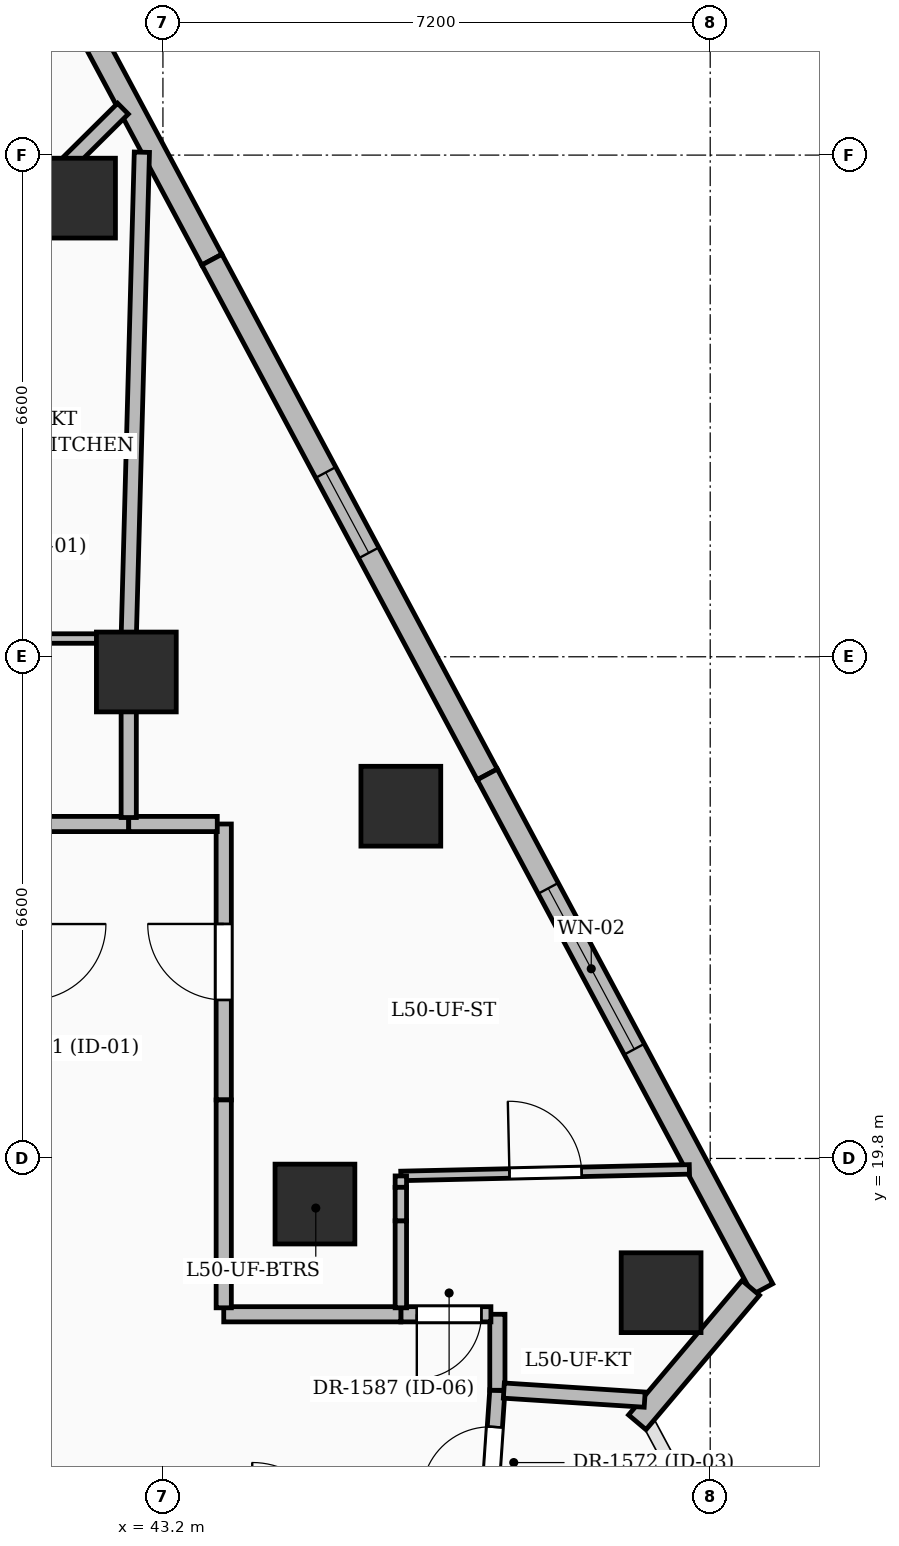
"""IFC4 building model, lengths in metres.
Left out: names, types, materials, properties, quantities, classifications, styles, units other than length and angle.
Written with IfcOpenShell. Run it as: python <this file> out.ifc"""

import sys

from ifc_helpers import new_model, si_unit, direction, frame, frame_2d, origin, origin_2d, place, context, subcontext, project, spatial, rectangle, extrude, element, fill, save


model = new_model("IFC4")
c1 = context("Model", 3, precision=1e-05, world=origin(), true_north=direction((0.0, 1.0)))
c2 = subcontext(c1, "Body", "Model", "MODEL_VIEW")
j1 = project(units=[si_unit("LENGTHUNIT", "METRE"), si_unit("PLANEANGLEUNIT", "RADIAN")], contexts=[c1])
p1 = place(None, origin())
s1 = spatial("IfcSite", under=j1, at=p1, CompositionType="ELEMENT")
p2 = place(p1, origin())
s2 = spatial("IfcBuilding", under=s1, at=p2, CompositionType="ELEMENT")
p3 = place(p2, frame((0.0, 0.0, 193.2)))
s3 = spatial("IfcBuildingStorey", under=s2, at=p3, CompositionType="ELEMENT", Elevation=193.2)
for number, where, z_axis, x_axis in (
    (1, (45.2, 19.2, 0.0), (0.0, 0.0, 1.0), (1.0, 0.0, 0.0)),
    (2, (42.85, 26.2, 0.0), (0.0, 0.0, 1.0), (1.0, 0.0, 0.0)),
    (3, (49.754, 18.034, 0.0), (0.0, 0.0, 1.0), (1.0, 0.0, 0.0)),
    (4, (46.33, 24.434, 0.0), (0.0, 0.0, 1.0), (1.0, 0.0, 0.0)),
    (5, (42.05, 32.434, 0.0), (0.0, 0.0, 1.0), (1.0, 0.0, 0.0)),
):
    element("IfcColumn", number, at=place(p3, frame(where, z_axis=z_axis, x_axis=x_axis)), inside=s3, PredefinedType="COLUMN", context=c2, shape_type="SweptSolid", body=[
        extrude(rectangle(XDim=1.05, YDim=1.05, at=origin_2d()), origin(), (0.0, 0.0, 1.0), 3.6),
    ])
p4 = place(p3, frame((40.495, 37.885, 0.0), z_axis=(0.0, 0.0, 1.0), x_axis=(0.471731834897, -0.88174206883, 0.0)))
e6 = element("IfcWall", 6, at=p4, inside=s3, PredefinedType="SOLIDWALL", context=c2, shape_type="SweptSolid", body=[
    extrude(rectangle(XDim=7.1, YDim=0.3, at=frame_2d((3.55, 0.0))), origin(), (0.0, 0.0, 1.0), 3.3),
])
p5 = place(p4, frame((2.07, 0.0, 0.6)))
e7 = element("IfcOpeningElement", 7, at=p5, cuts=e6, PredefinedType="OPENING", context=c2, shape_type="SweptSolid", body=[
    extrude(rectangle(XDim=1.5, YDim=2.1, at=frame_2d((0.75, 1.05))), frame((0.0, 0.16, 0.0), z_axis=(0.0, -1.0, 0.0), x_axis=(1.0, 0.0, 0.0)), (0.0, 0.0, 1.0), 0.32),
])
p6 = place(p3, frame((43.844, 31.625, 0.0), z_axis=(0.0, 0.0, 1.0), x_axis=(0.471736169991, -0.881739749542, 0.0)))
e8 = element("IfcWall", 8, at=p6, inside=s3, PredefinedType="SOLIDWALL", context=c2, shape_type="SweptSolid", body=[
    extrude(rectangle(XDim=7.68, YDim=0.3, at=frame_2d((3.84, 0.0))), origin(), (0.0, 0.0, 1.0), 3.3),
])
p7 = place(p6, frame((3.175, 0.0, 0.8)))
e9 = element("IfcOpeningElement", 9, at=p7, cuts=e8, PredefinedType="OPENING", context=c2, shape_type="SweptSolid", body=[
    extrude(rectangle(XDim=1.2, YDim=1.8, at=frame_2d((0.6, 0.9))), frame((0.0, 0.16, 0.0), z_axis=(0.0, -1.0, 0.0), x_axis=(1.0, 0.0, 0.0)), (0.0, 0.0, 1.0), 0.32),
])
p8 = place(p3, frame((47.467, 24.853, 0.0), z_axis=(0.0, 0.0, 1.0), x_axis=(0.471736169991, -0.881739749542, 0.0)))
e10 = element("IfcWall", 10, at=p8, inside=s3, PredefinedType="SOLIDWALL", context=c2, shape_type="SweptSolid", body=[
    extrude(rectangle(XDim=7.68, YDim=0.3, at=frame_2d((3.84, 0.0))), origin(), (0.0, 0.0, 1.0), 3.3),
])
p9 = place(p8, frame((1.7, 0.0, 0.6)))
e11 = element("IfcOpeningElement", 11, at=p9, cuts=e10, PredefinedType="OPENING", context=c2, shape_type="SweptSolid", body=[
    extrude(rectangle(XDim=2.4, YDim=2.1, at=frame_2d((1.2, 1.05))), frame((0.0, 0.16, 0.0), z_axis=(0.0, -1.0, 0.0), x_axis=(1.0, 0.0, 0.0)), (0.0, 0.0, 1.0), 0.32),
])
p10 = place(p3, frame((50.934, 18.097, 0.0), z_axis=(0.0, 0.0, 1.0), x_axis=(-0.645152076947, -0.764054184996, 0.0)))
e12 = element("IfcWall", 12, at=p10, inside=s3, PredefinedType="SOLIDWALL", context=c2, shape_type="SweptSolid", body=[
    extrude(rectangle(XDim=2.314, YDim=0.3, at=frame_2d((1.157, 0.0))), origin(), (0.0, 0.0, 1.0), 2.525),
])
p11 = place(p3, frame((47.425, 14.2, 0.0), z_axis=(0.0, 0.0, 1.0), x_axis=(0.068484119878, 0.997652206595, 0.0)))
e13 = element("IfcWall", 13, at=p11, inside=s3, PredefinedType="PARTITIONING", context=c2, shape_type="SweptSolid", body=[
    extrude(rectangle(XDim=2.556, YDim=0.2, at=frame_2d((1.278, 0.0))), origin(), (0.0, 0.0, 1.0), 2.414),
])
p12 = place(p11, frame((1.172, 0.0, 0.0)))
e14 = element("IfcOpeningElement", 14, at=p12, cuts=e13, PredefinedType="OPENING", context=c2, shape_type="SweptSolid", body=[
    extrude(rectangle(XDim=0.9, YDim=2.1, at=frame_2d((0.45, 1.05))), frame((0.0, 0.11, 0.0), z_axis=(0.0, -1.0, 0.0), x_axis=(1.0, 0.0, 0.0)), (0.0, 0.0, 1.0), 0.22),
])
p13 = place(p3, frame((42.75, 24.2, 0.0), z_axis=(0.0, 0.0, 1.0), x_axis=(-1.0, 0.0, 0.0)))
e15 = element("IfcWall", 15, at=p13, inside=s3, PredefinedType="PARTITIONING", context=c2, shape_type="SweptSolid", body=[
    extrude(rectangle(XDim=1.3, YDim=0.2, at=frame_2d((0.65, 0.0))), origin(), (0.0, 0.0, 1.0), 3.3),
])
p14 = place(p3, frame((44.0, 20.57, 0.0), z_axis=(0.0, 0.0, 1.0), x_axis=(0.0, 1.0, 0.0)))
e16 = element("IfcWall", 16, at=p14, inside=s3, PredefinedType="PARTITIONING", context=c2, shape_type="SweptSolid", body=[
    extrude(rectangle(XDim=3.63, YDim=0.2, at=frame_2d((1.815, 0.0))), origin(), (0.0, 0.0, 1.0), 2.386),
])
p15 = place(p14, frame((1.315, 0.0, 0.0)))
e17 = element("IfcOpeningElement", 17, at=p15, cuts=e16, PredefinedType="OPENING", context=c2, shape_type="SweptSolid", body=[
    extrude(rectangle(XDim=1.0, YDim=2.2, at=frame_2d((0.5, 1.1))), frame((0.0, 0.11, 0.0), z_axis=(0.0, -1.0, 0.0), x_axis=(1.0, 0.0, 0.0)), (0.0, 0.0, 1.0), 0.22),
])
p16 = place(p3, frame((43.915, 24.2, 0.0), z_axis=(0.0, 0.0, 1.0), x_axis=(-1.0, 0.0, 0.0)))
e18 = element("IfcWall", 18, at=p16, inside=s3, PredefinedType="PARTITIONING", context=c2, shape_type="SweptSolid", body=[
    extrude(rectangle(XDim=1.165, YDim=0.2, at=frame_2d((0.583, 0.0))), origin(), (0.0, 0.0, 1.0), 2.386),
])
p17 = place(p3, frame((47.6, 16.75, 0.0), z_axis=(0.0, 0.0, 1.0), x_axis=(0.0, 1.0, 0.0)))
e19 = element("IfcWall", 19, at=p17, inside=s3, PredefinedType="PARTITIONING", context=c2, shape_type="SweptSolid", body=[
    extrude(rectangle(XDim=1.0, YDim=0.2, at=frame_2d((0.5, 0.0))), origin(), (0.0, 0.0, 1.0), 2.721),
])
p18 = place(p3, frame((47.515, 17.75, 0.0), z_axis=(0.0, 0.0, 1.0), x_axis=(-1.0, 0.0, 0.0)))
e20 = element("IfcWall", 20, at=p18, inside=s3, PredefinedType="PARTITIONING", context=c2, shape_type="SweptSolid", body=[
    extrude(rectangle(XDim=1.185, YDim=0.2, at=frame_2d((0.592, 0.0))), origin(), (0.0, 0.0, 1.0), 2.721),
])
p19 = place(p18, frame((0.125, 0.0, 0.0)))
e21 = element("IfcOpeningElement", 21, at=p19, cuts=e20, PredefinedType="OPENING", context=c2, shape_type="SweptSolid", body=[
    extrude(rectangle(XDim=0.85, YDim=2.1, at=frame_2d((0.425, 1.05))), frame((0.0, 0.11, 0.0), z_axis=(0.0, -1.0, 0.0), x_axis=(1.0, 0.0, 0.0)), (0.0, 0.0, 1.0), 0.22),
])
p20 = place(p3, frame((46.33, 17.75, 0.0), z_axis=(0.0, 0.0, 1.0), x_axis=(-1.0, 0.0, 0.0)))
e22 = element("IfcWall", 22, at=p20, inside=s3, PredefinedType="PARTITIONING", context=c2, shape_type="SweptSolid", body=[
    extrude(rectangle(XDim=2.33, YDim=0.2, at=frame_2d((1.165, 0.0))), origin(), (0.0, 0.0, 1.0), 2.386),
])
p21 = place(p3, frame((49.538, 16.627, 0.0), z_axis=(0.0, 0.0, 1.0), x_axis=(-0.997939995932, 0.064154224478, 0.0)))
e23 = element("IfcWall", 23, at=p21, inside=s3, PredefinedType="PARTITIONING", context=c2, shape_type="SweptSolid", body=[
    extrude(rectangle(XDim=1.857, YDim=0.2, at=frame_2d((0.929, 0.0))), origin(), (0.0, 0.0, 1.0), 2.414),
])
p22 = place(p3, frame((42.75, 26.64, 0.0), z_axis=(0.0, 0.0, 1.0), x_axis=(-1.0, 0.0, 0.0)))
e24 = element("IfcWall", 24, at=p22, inside=s3, PredefinedType="PARTITIONING", context=c2, shape_type="SweptSolid", body=[
    extrude(rectangle(XDim=5.4, YDim=0.125, at=frame_2d((2.7, 0.0))), origin(), (0.0, 0.0, 1.0), 3.3),
])
p23 = place(p22, frame((2.165, 0.0, 0.0)))
e25 = element("IfcOpeningElement", 25, at=p23, cuts=e24, PredefinedType="OPENING", context=c2, shape_type="SweptSolid", body=[
    extrude(rectangle(XDim=0.95, YDim=2.2, at=frame_2d((0.475, 1.1))), frame((0.0, 0.072, 0.0), z_axis=(0.0, -1.0, 0.0), x_axis=(1.0, 0.0, 0.0)), (0.0, 0.0, 1.0), 0.145),
])
p24 = place(p3, frame((42.75, 24.285, 0.0), z_axis=(0.0, 0.0, 1.0), x_axis=(0.0, 1.0, 0.0)))
e26 = element("IfcWall", 26, at=p24, inside=s3, PredefinedType="PARTITIONING", context=c2, shape_type="SweptSolid", body=[
    extrude(rectangle(XDim=2.308, YDim=0.2, at=frame_2d((1.154, 0.0))), origin(), (0.0, 0.0, 1.0), 3.3),
])
p25 = place(p3, frame((42.751, 26.688, 0.0), z_axis=(0.0, 0.0, 1.0), x_axis=(0.027092926653, 0.999632919289, 0.0)))
e27 = element("IfcWall", 27, at=p25, inside=s3, PredefinedType="PARTITIONING", context=c2, shape_type="SweptSolid", body=[
    extrude(rectangle(XDim=6.353, YDim=0.2, at=frame_2d((3.177, 0.0))), origin(), (0.0, 0.0, 1.0), 2.414),
])
p26 = place(p3, frame((42.674, 33.611, 0.0), z_axis=(0.0, 0.0, 1.0), x_axis=(-0.710345403642, -0.703853257096, 0.0)))
e28 = element("IfcWall", 28, at=p26, inside=s3, PredefinedType="PARTITIONING", context=c2, shape_type="SweptSolid", body=[
    extrude(rectangle(XDim=11.207, YDim=0.2, at=frame_2d((5.603, 0.0))), origin(), (0.0, 0.0, 1.0), 2.414),
])
p27 = place(p26, frame((5.043, 0.0, 0.0)))
e29 = element("IfcOpeningElement", 29, at=p27, cuts=e28, PredefinedType="OPENING", context=c2, shape_type="SweptSolid", body=[
    extrude(rectangle(XDim=0.95, YDim=2.2, at=frame_2d((0.475, 1.1))), frame((0.0, 0.11, 0.0), z_axis=(0.0, -1.0, 0.0), x_axis=(1.0, 0.0, 0.0)), (0.0, 0.0, 1.0), 0.22),
])
p28 = place(p3, frame((46.33, 19.57, 0.0), z_axis=(0.0, 0.0, 1.0), x_axis=(0.999743823458, 0.022633768064, 0.0)))
e30 = element("IfcWall", 30, at=p28, inside=s3, PredefinedType="PARTITIONING", context=c2, shape_type="SweptSolid", body=[
    extrude(rectangle(XDim=3.797, YDim=0.125, at=frame_2d((1.898, 0.0))), origin(), (0.0, 0.0, 1.0), 2.52),
])
p29 = place(p28, frame((1.429, 0.0, 0.0)))
e31 = element("IfcOpeningElement", 31, at=p29, cuts=e30, PredefinedType="OPENING", context=c2, shape_type="SweptSolid", body=[
    extrude(rectangle(XDim=0.95, YDim=2.2, at=frame_2d((0.475, 1.1))), frame((0.0, 0.072, 0.0), z_axis=(0.0, -1.0, 0.0), x_axis=(1.0, 0.0, 0.0)), (0.0, 0.0, 1.0), 0.145),
])
p30 = place(p3, frame((46.33, 18.98, 0.0), z_axis=(0.0, 0.0, 1.0), x_axis=(0.0, -1.0, 0.0)))
e32 = element("IfcWall", 32, at=p30, inside=s3, PredefinedType="PARTITIONING", context=c2, shape_type="SweptSolid", body=[
    extrude(rectangle(XDim=1.145, YDim=0.15, at=frame_2d((0.573, 0.0))), origin(), (0.0, 0.0, 1.0), 2.721),
])
p31 = place(p3, frame((46.33, 19.57, 0.0), z_axis=(0.0, 0.0, 1.0), x_axis=(0.0, -1.0, 0.0)))
e33 = element("IfcWall", 33, at=p31, inside=s3, PredefinedType="PARTITIONING", context=c2, shape_type="SweptSolid", body=[
    extrude(rectangle(XDim=0.15, YDim=0.15, at=frame_2d((0.075, 0.0))), origin(), (0.0, 0.0, 1.0), 3.3),
])
p32 = place(p3, frame((44.0, 17.835, 0.0), z_axis=(0.0, 0.0, 1.0), x_axis=(0.0, 1.0, 0.0)))
e34 = element("IfcWall", 34, at=p32, inside=s3, PredefinedType="PARTITIONING", context=c2, shape_type="SweptSolid", body=[
    extrude(rectangle(XDim=2.735, YDim=0.2, at=frame_2d((1.368, 0.0))), origin(), (0.0, 0.0, 1.0), 3.3),
])
p33 = place(p3, frame((46.33, 19.42, 0.0), z_axis=(0.0, 0.0, 1.0), x_axis=(0.0, -1.0, 0.0)))
e35 = element("IfcWall", 35, at=p33, inside=s3, PredefinedType="PARTITIONING", context=c2, shape_type="SweptSolid", body=[
    extrude(rectangle(XDim=0.44, YDim=0.15, at=frame_2d((0.22, 0.0))), origin(), (0.0, 0.0, 1.0), 2.721),
])
p34 = place(p7, origin())
e36 = element("IfcWindow", 36, at=p34, inside=s3, PartitioningType="SINGLE_PANEL", PredefinedType="WINDOW", context=c2, shape_type="SweptSolid", body=[
    extrude(rectangle(XDim=1.2, YDim=1.8, at=frame_2d((0.6, 0.9))), frame((0.0, 0.03, 0.0), z_axis=(0.0, -1.0, 0.0), x_axis=(1.0, 0.0, 0.0)), (0.0, 0.0, 1.0), 0.06),
])
fill(e9, e36)
p35 = place(p9, origin())
e37 = element("IfcWindow", 37, at=p35, inside=s3, PartitioningType="SINGLE_PANEL", PredefinedType="WINDOW", context=c2, shape_type="SweptSolid", body=[
    extrude(rectangle(XDim=2.4, YDim=2.1, at=frame_2d((1.2, 1.05))), frame((0.0, 0.03, 0.0), z_axis=(0.0, -1.0, 0.0), x_axis=(1.0, 0.0, 0.0)), (0.0, 0.0, 1.0), 0.06),
])
fill(e11, e37)
p36 = place(p12, origin())
e38 = element("IfcDoor", 38, at=p36, inside=s3, OperationType="SINGLE_SWING_LEFT", PredefinedType="DOOR", context=c2, shape_type="SweptSolid", body=[
    extrude(rectangle(XDim=0.9, YDim=2.1, at=frame_2d((0.45, 1.05))), frame((0.0, 0.025, 0.0), z_axis=(0.0, -1.0, 0.0), x_axis=(1.0, 0.0, 0.0)), (0.0, 0.0, 1.0), 0.05),
])
fill(e14, e38)
p37 = place(p15, origin())
e39 = element("IfcDoor", 39, at=p37, inside=s3, OperationType="SINGLE_SWING_RIGHT", PredefinedType="DOOR", context=c2, shape_type="SweptSolid", body=[
    extrude(rectangle(XDim=1.0, YDim=2.2, at=frame_2d((0.5, 1.1))), frame((0.0, 0.025, 0.0), z_axis=(0.0, -1.0, 0.0), x_axis=(1.0, 0.0, 0.0)), (0.0, 0.0, 1.0), 0.05),
])
fill(e17, e39)
p38 = place(p29, origin())
e40 = element("IfcDoor", 40, at=p38, inside=s3, OperationType="SINGLE_SWING_LEFT", PredefinedType="DOOR", context=c2, shape_type="SweptSolid", body=[
    extrude(rectangle(XDim=0.95, YDim=2.2, at=frame_2d((0.475, 1.1))), frame((0.0, 0.025, 0.0), z_axis=(0.0, -1.0, 0.0), x_axis=(1.0, 0.0, 0.0)), (0.0, 0.0, 1.0), 0.05),
])
fill(e31, e40)
p39 = place(p19, origin())
e41 = element("IfcDoor", 41, at=p39, inside=s3, OperationType="SINGLE_SWING_RIGHT", PredefinedType="DOOR", context=c2, shape_type="SweptSolid", body=[
    extrude(rectangle(XDim=0.85, YDim=2.1, at=frame_2d((0.425, 1.05))), frame((0.0, 0.025, 0.0), z_axis=(0.0, -1.0, 0.0), x_axis=(1.0, 0.0, 0.0)), (0.0, 0.0, 1.0), 0.05),
])
fill(e21, e41)
save(model, sys.argv[1])
